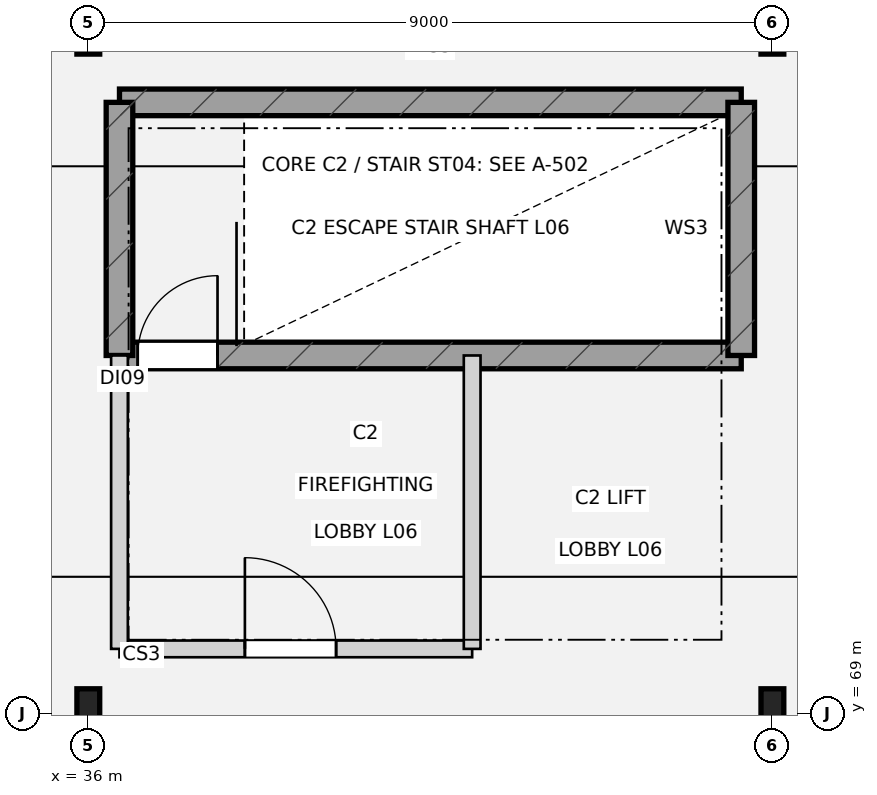
"""IFC4 building model, lengths in metres.
Left out: names, types, materials, properties, quantities, classifications, styles, units other than length and angle.
Written with IfcOpenShell. Run it as: python <this file> out.ifc"""

import sys

from ifc_helpers import new_model, si_unit, direction, frame, frame_2d, origin, origin_2d, place, context, subcontext, project, spatial, rectangle, i_section, extrude, element, fill, save


model = new_model("IFC4")
c1 = context("Model", 3, precision=1e-05, world=origin(), true_north=direction((0.0, 1.0)))
c2 = subcontext(c1, "Body", "Model", "MODEL_VIEW")
j1 = project(units=[si_unit("LENGTHUNIT", "METRE"), si_unit("PLANEANGLEUNIT", "RADIAN")], contexts=[c1])
p1 = place(None, origin())
s1 = spatial("IfcSite", under=j1, at=p1, CompositionType="ELEMENT")
p2 = place(p1, origin())
s2 = spatial("IfcBuilding", under=s1, at=p2, CompositionType="ELEMENT")
p3 = place(p2, frame((0.0, 0.0, 30.6)))
s3 = spatial("IfcBuildingStorey", under=s2, at=p3, CompositionType="ELEMENT", Elevation=30.6)
for number, where, z_axis, x_axis in (
    (1, (36.0, 69.0, 0.0), (0.0, 0.0, 1.0), (1.0, 0.0, 0.0)),
    (2, (36.0, 78.0, 0.0), (0.0, 0.0, 1.0), (1.0, 0.0, 0.0)),
    (3, (45.0, 69.0, 0.0), (0.0, 0.0, 1.0), (1.0, 0.0, 0.0)),
    (4, (45.0, 78.0, 0.0), (0.0, 0.0, 1.0), (1.0, 0.0, 0.0)),
):
    element("IfcColumn", number, at=place(p3, frame(where, z_axis=z_axis, x_axis=x_axis)), inside=s3, PredefinedType="COLUMN", context=c2, shape_type="SweptSolid", body=[
        extrude(i_section(OverallWidth=0.3, OverallDepth=0.65, WebThickness=0.016, FlangeThickness=0.031, at=origin_2d()), origin(), (0.0, 0.0, 1.0), 4.2),
    ])
p4 = place(p3, frame((36.41, 73.71, 0.0), z_axis=(0.0, 0.0, 1.0), x_axis=(1.0, 0.0, 0.0)))
e5 = element("IfcWall", 5, at=p4, inside=s3, PredefinedType="SHEAR", context=c2, shape_type="SweptSolid", body=[
    extrude(rectangle(XDim=8.18, YDim=0.35, at=frame_2d((4.09, 0.0))), origin(), (0.0, 0.0, 1.0), 3.8),
])
p5 = place(p4, frame((0.24, 0.0, 0.0)))
e6 = element("IfcOpeningElement", 6, at=p5, cuts=e5, PredefinedType="OPENING", context=c2, shape_type="SweptSolid", body=[
    extrude(rectangle(XDim=1.05, YDim=2.18, at=frame_2d((0.525, 1.09))), frame((0.0, 0.185, 0.0), z_axis=(0.0, -1.0, 0.0), x_axis=(1.0, 0.0, 0.0)), (0.0, 0.0, 1.0), 0.37),
])
p6 = place(p3, frame((36.41, 77.04, 0.0), z_axis=(0.0, 0.0, 1.0), x_axis=(1.0, 0.0, 0.0)))
e7 = element("IfcWall", 7, at=p6, inside=s3, PredefinedType="SHEAR", context=c2, shape_type="SweptSolid", body=[
    extrude(rectangle(XDim=8.18, YDim=0.35, at=frame_2d((4.09, 0.0))), origin(), (0.0, 0.0, 1.0), 3.8),
])
for number, where, z_axis, x_axis in (
    (8, (36.41, 73.71, 0.0), (0.0, 0.0, 1.0), (0.0, 1.0, 0.0)),
    (9, (44.59, 73.71, 0.0), (0.0, 0.0, 1.0), (0.0, 1.0, 0.0)),
):
    element("IfcWall", number, at=place(p3, frame(where, z_axis=z_axis, x_axis=x_axis)), inside=s3, PredefinedType="SHEAR", context=c2, shape_type="SweptSolid", body=[
        extrude(rectangle(XDim=3.33, YDim=0.35, at=frame_2d((1.665, 0.0))), origin(), (0.0, 0.0, 1.0), 3.8),
    ])
p7 = place(p3, frame((36.41, 69.85, 0.0), z_axis=(0.0, 0.0, 1.0), x_axis=(1.0, 0.0, 0.0)))
e10 = element("IfcWall", 10, at=p7, inside=s3, PredefinedType="PARTITIONING", context=c2, shape_type="SweptSolid", body=[
    extrude(rectangle(XDim=4.64, YDim=0.22, at=frame_2d((2.32, 0.0))), origin(), (0.0, 0.0, 1.0), 3.215),
])
p8 = place(p7, frame((1.65, 0.0, 0.0)))
e11 = element("IfcOpeningElement", 11, at=p8, cuts=e10, PredefinedType="OPENING", context=c2, shape_type="SweptSolid", body=[
    extrude(rectangle(XDim=1.2, YDim=2.18, at=frame_2d((0.6, 1.09))), frame((0.0, 0.12, 0.0), z_axis=(0.0, -1.0, 0.0), x_axis=(1.0, 0.0, 0.0)), (0.0, 0.0, 1.0), 0.24),
])
for number, where, z_axis, x_axis in (
    (12, (36.41, 69.85, 0.0), (0.0, 0.0, 1.0), (0.0, 1.0, 0.0)),
    (13, (41.05, 69.85, 0.0), (0.0, 0.0, 1.0), (0.0, 1.0, 0.0)),
):
    element("IfcWall", number, at=place(p3, frame(where, z_axis=z_axis, x_axis=x_axis)), inside=s3, PredefinedType="PARTITIONING", context=c2, shape_type="SweptSolid", body=[
        extrude(rectangle(XDim=3.86, YDim=0.22, at=frame_2d((1.93, 0.0))), origin(), (0.0, 0.0, 1.0), 2.755),
    ])
p9 = place(p5, origin())
e14 = element("IfcDoor", 14, at=p9, inside=s3, OperationType="SINGLE_SWING_RIGHT", PredefinedType="DOOR", context=c2, shape_type="SweptSolid", body=[
    extrude(rectangle(XDim=1.05, YDim=2.18, at=frame_2d((0.525, 1.09))), frame((0.0, 0.025, 0.0), z_axis=(0.0, -1.0, 0.0), x_axis=(1.0, 0.0, 0.0)), (0.0, 0.0, 1.0), 0.05),
])
fill(e6, e14)
p10 = place(p8, origin())
e15 = element("IfcDoor", 15, at=p10, inside=s3, OperationType="SINGLE_SWING_LEFT", PredefinedType="DOOR", context=c2, shape_type="SweptSolid", body=[
    extrude(rectangle(XDim=1.2, YDim=2.18, at=frame_2d((0.6, 1.09))), frame((0.0, 0.025, 0.0), z_axis=(0.0, -1.0, 0.0), x_axis=(1.0, 0.0, 0.0)), (0.0, 0.0, 1.0), 0.05),
])
fill(e11, e15)
save(model, sys.argv[1])
